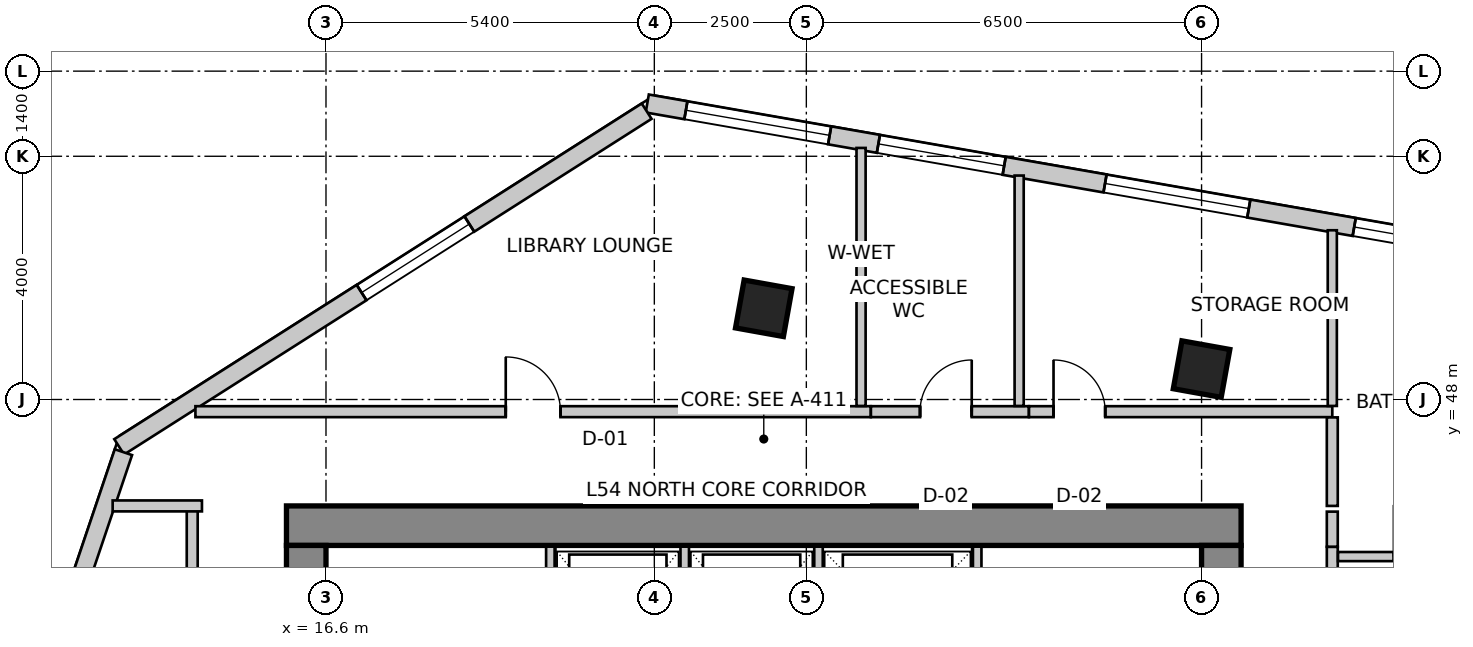
"""IFC4 building model, lengths in metres.
Left out: names, types, materials, properties, quantities, classifications, styles, units other than length and angle.
Written with IfcOpenShell. Run it as: python <this file> out.ifc"""

import sys

from ifc_helpers import new_model, si_unit, direction, frame, frame_2d, origin, origin_2d, place, context, subcontext, project, spatial, rectangle, extrude, source, transform, mapped, element, fill, save


model = new_model("IFC4")
c1 = context("Model", 3, precision=1e-05, world=origin(), true_north=direction((0.0, 1.0)))
c2 = subcontext(c1, "Body", "Model", "MODEL_VIEW")
j1 = project(units=[si_unit("LENGTHUNIT", "METRE"), si_unit("PLANEANGLEUNIT", "RADIAN")], contexts=[c1])
p1 = place(None, origin())
s1 = spatial("IfcSite", under=j1, at=p1, CompositionType="ELEMENT")
p2 = place(p1, origin())
s2 = spatial("IfcBuilding", under=s1, at=p2, CompositionType="ELEMENT")
p3 = place(p2, frame((0.0, 0.0, 214.9)))
s3 = spatial("IfcBuildingStorey", under=s2, at=p3, CompositionType="ELEMENT", Elevation=214.9)
p4 = place(p3, frame((15.95, 45.925, 0.0), z_axis=(0.0, 0.0, 1.0), x_axis=(1.0, 0.0, 0.0)))
e1 = element("IfcWall", 1, at=p4, inside=s3, PredefinedType="SHEAR", context=c2, shape_type="SweptSolid", body=[
    extrude(rectangle(XDim=15.7, YDim=0.65, at=frame_2d((7.85, 0.0))), origin(), (0.0, 0.0, 1.0), 3.5),
])
p5 = place(p3, frame((16.275, 34.2, 0.0), z_axis=(0.0, 0.0, 1.0), x_axis=(0.0, 1.0, 0.0)))
e2 = element("IfcWall", 2, at=p5, inside=s3, PredefinedType="SHEAR", context=c2, shape_type="SweptSolid", body=[
    extrude(rectangle(XDim=11.4, YDim=0.65, at=frame_2d((5.7, 0.0))), origin(), (0.0, 0.0, 1.0), 3.5),
])
m1 = source(origin(), c2, "Body", "SweptSolid", [
    extrude(rectangle(XDim=1.1, YDim=2.15, at=frame_2d((0.55, 1.075))), frame((0.0, 0.335, 0.0), z_axis=(0.0, -1.0, 0.0), x_axis=(1.0, 0.0, 0.0)), (0.0, 0.0, 1.0), 0.67),
])
p6 = place(p5, frame((7.15, 0.0, 0.0)))
e3 = element("IfcOpeningElement", 3, at=p6, cuts=e2, PredefinedType="OPENING", context=c2, shape_type="MappedRepresentation", body=[
    mapped(m1, transform((0.0, 0.0, 0.0), scale=1.0)),
])
p7 = place(p3, frame((31.325, 34.2, 0.0), z_axis=(0.0, 0.0, 1.0), x_axis=(0.0, 1.0, 0.0)))
e4 = element("IfcWall", 4, at=p7, inside=s3, PredefinedType="SHEAR", context=c2, shape_type="SweptSolid", body=[
    extrude(rectangle(XDim=11.4, YDim=0.65, at=frame_2d((5.7, 0.0))), origin(), (0.0, 0.0, 1.0), 3.5),
])
p8 = place(p7, frame((7.35, 0.0, 0.0)))
e5 = element("IfcOpeningElement", 5, at=p8, cuts=e4, PredefinedType="OPENING", context=c2, shape_type="MappedRepresentation", body=[
    mapped(m1, transform((0.0, 0.0, 0.0), scale=1.0)),
])
m2 = source(origin(), c2, "Body", "SweptSolid", [
    extrude(rectangle(XDim=0.8, YDim=0.8, at=origin_2d()), origin(), (0.0, 0.0, 1.0), 3.5),
])
for number, where, z_axis, x_axis in (
    (6, (23.8, 49.5, 0.0), (0.0, 0.0, 1.0), (0.984, -0.177, 0.0)),
    (7, (31.0, 48.5, 0.0), (0.0, 0.0, 1.0), (0.984, -0.177, 0.0)),
):
    element("IfcColumn", number, at=place(p3, frame(where, z_axis=z_axis, x_axis=x_axis)), inside=s3, PredefinedType="COLUMN", context=c2, shape_type="MappedRepresentation", body=[
        mapped(m2, transform((0.0, 0.0, 0.0), scale=1.0)),
    ])
p9 = place(p3, frame((43.561, 49.081, 0.0), z_axis=(0.0, 0.0, 1.0), x_axis=(-0.985083967494, 0.17207433564, 0.0)))
e8 = element("IfcWall", 8, at=p9, inside=s3, PredefinedType="SOLIDWALL", context=c2, shape_type="SweptSolid", body=[
    extrude(rectangle(XDim=22.006, YDim=0.3, at=frame_2d((11.003, 0.0))), origin(), (0.0, 0.0, 1.0), 3.25),
])
m3 = source(origin(), c2, "Body", "SweptSolid", [
    extrude(rectangle(XDim=2.4, YDim=2.2, at=frame_2d((1.2, 1.1))), frame((0.0, 0.16, 0.0), z_axis=(0.0, -1.0, 0.0), x_axis=(1.0, 0.0, 0.0)), (0.0, 0.0, 1.0), 0.32),
])
p10 = place(p9, frame((0.8, 0.0, 0.85)))
e9 = element("IfcOpeningElement", 9, at=p10, cuts=e8, PredefinedType="OPENING", context=c2, shape_type="MappedRepresentation", body=[
    mapped(m3, transform((0.0, 0.0, 0.0), scale=1.0)),
])
p11 = place(p9, frame((4.628, 0.0, 0.85)))
e10 = element("IfcOpeningElement", 10, at=p11, cuts=e8, PredefinedType="OPENING", context=c2, shape_type="MappedRepresentation", body=[
    mapped(m3, transform((0.0, 0.0, 0.0), scale=1.0)),
])
m4 = source(origin(), c2, "Body", "SweptSolid", [
    extrude(rectangle(XDim=2.1, YDim=2.0, at=frame_2d((1.05, 1.0))), frame((0.0, 0.16, 0.0), z_axis=(0.0, -1.0, 0.0), x_axis=(1.0, 0.0, 0.0)), (0.0, 0.0, 1.0), 0.32),
])
p12 = place(p9, frame((8.103, 0.0, 0.85)))
e11 = element("IfcOpeningElement", 11, at=p12, cuts=e8, PredefinedType="OPENING", context=c2, shape_type="MappedRepresentation", body=[
    mapped(m4, transform((0.0, 0.0, 0.0), scale=1.0)),
])
p13 = place(p9, frame((11.963, 0.0, 0.85)))
e12 = element("IfcOpeningElement", 12, at=p13, cuts=e8, PredefinedType="OPENING", context=c2, shape_type="MappedRepresentation", body=[
    mapped(m3, transform((0.0, 0.0, 0.0), scale=1.0)),
])
p14 = place(p9, frame((16.047, 0.0, 0.85)))
e13 = element("IfcOpeningElement", 13, at=p14, cuts=e8, PredefinedType="OPENING", context=c2, shape_type="MappedRepresentation", body=[
    mapped(m4, transform((0.0, 0.0, 0.0), scale=1.0)),
])
p15 = place(p9, frame((18.961, 0.0, 0.85)))
e14 = element("IfcOpeningElement", 14, at=p15, cuts=e8, PredefinedType="OPENING", context=c2, shape_type="MappedRepresentation", body=[
    mapped(m3, transform((0.0, 0.0, 0.0), scale=1.0)),
])
p16 = place(p3, frame((21.874, 52.742, 0.0), z_axis=(0.0, 0.0, 1.0), x_axis=(-0.84365659959, -0.536883173482, 0.0)))
e15 = element("IfcWall", 15, at=p16, inside=s3, PredefinedType="SOLIDWALL", context=c2, shape_type="SweptSolid", body=[
    extrude(rectangle(XDim=10.283, YDim=0.3, at=frame_2d((5.142, 0.0))), origin(), (0.0, 0.0, 1.0), 3.25),
])
p17 = place(p16, frame((3.457, 0.0, 0.85)))
e16 = element("IfcOpeningElement", 16, at=p17, cuts=e15, PredefinedType="OPENING", context=c2, shape_type="MappedRepresentation", body=[
    mapped(m4, transform((0.0, 0.0, 0.0), scale=1.0)),
])
p18 = place(p3, frame((13.269, 47.134, 0.0), z_axis=(0.0, 0.0, 1.0), x_axis=(-0.319920776449, -0.947444297464, 0.0)))
e17 = element("IfcWall", 17, at=p18, inside=s3, PredefinedType="SOLIDWALL", context=c2, shape_type="SweptSolid", body=[
    extrude(rectangle(XDim=16.133, YDim=0.3, at=frame_2d((8.067, 0.0))), origin(), (0.0, 0.0, 1.0), 3.25),
])
p19 = place(p18, frame((2.363, 0.0, 0.85)))
e18 = element("IfcOpeningElement", 18, at=p19, cuts=e17, PredefinedType="OPENING", context=c2, shape_type="MappedRepresentation", body=[
    mapped(m3, transform((0.0, 0.0, 0.0), scale=1.0)),
])
p20 = place(p18, frame((7.41, 0.0, 0.85)))
e19 = element("IfcOpeningElement", 19, at=p20, cuts=e17, PredefinedType="OPENING", context=c2, shape_type="MappedRepresentation", body=[
    mapped(m4, transform((0.0, 0.0, 0.0), scale=1.0)),
])
p21 = place(p18, frame((12.157, 0.0, 0.85)))
e20 = element("IfcOpeningElement", 20, at=p21, cuts=e17, PredefinedType="OPENING", context=c2, shape_type="MappedRepresentation", body=[
    mapped(m3, transform((0.0, 0.0, 0.0), scale=1.0)),
])
for number, where, z_axis, x_axis in (
    (21, (20.29, 43.28, 0.0), (0.0, 0.0, 1.0), (0.0, 1.0, 0.0)),
    (22, (27.31, 43.28, 0.0), (0.0, 0.0, 1.0), (0.0, 1.0, 0.0)),
):
    element("IfcWall", number, at=place(p3, frame(where, z_axis=z_axis, x_axis=x_axis)), inside=s3, PredefinedType="SOLIDWALL", context=c2, shape_type="SweptSolid", body=[
        extrude(rectangle(XDim=2.3, YDim=0.14, at=frame_2d((1.15, 0.0))), origin(), (0.0, 0.0, 1.0), 3.25),
    ])
for number, where, z_axis, x_axis in (
    (23, (22.5, 43.02, 0.0), (0.0, 0.0, 1.0), (0.0, 1.0, 0.0)),
    (24, (24.7, 43.02, 0.0), (0.0, 0.0, 1.0), (0.0, 1.0, 0.0)),
):
    element("IfcWall", number, at=place(p3, frame(where, z_axis=z_axis, x_axis=x_axis)), inside=s3, PredefinedType="SOLIDWALL", context=c2, shape_type="SweptSolid", body=[
        extrude(rectangle(XDim=2.56, YDim=0.14, at=frame_2d((1.28, 0.0))), origin(), (0.0, 0.0, 1.0), 3.25),
    ])
p22 = place(p3, frame((14.4, 33.644, 0.0), z_axis=(0.0, 0.0, 1.0), x_axis=(0.0, 1.0, 0.0)))
e25 = element("IfcWall", 25, at=p22, inside=s3, PredefinedType="PARTITIONING", context=c2, shape_type="SweptSolid", body=[
    extrude(rectangle(XDim=12.606, YDim=0.18, at=frame_2d((6.303, 0.0))), origin(), (0.0, 0.0, 1.0), 3.25),
])
m5 = source(origin(), c2, "Body", "SweptSolid", [
    extrude(rectangle(XDim=0.9, YDim=2.15, at=frame_2d((0.45, 1.075))), frame((0.0, 0.1, 0.0), z_axis=(0.0, -1.0, 0.0), x_axis=(1.0, 0.0, 0.0)), (0.0, 0.0, 1.0), 0.2),
])
p23 = place(p22, frame((4.399, 0.0, 0.0)))
e26 = element("IfcOpeningElement", 26, at=p23, cuts=e25, PredefinedType="OPENING", context=c2, shape_type="MappedRepresentation", body=[
    mapped(m5, transform((0.0, 0.0, 0.0), scale=1.0)),
])
p24 = place(p3, frame((14.56, 46.25, 0.0), z_axis=(0.0, 0.0, 1.0), x_axis=(-1.0, 0.0, 0.0)))
e27 = element("IfcWall", 27, at=p24, inside=s3, PredefinedType="PARTITIONING", context=c2, shape_type="SweptSolid", body=[
    extrude(rectangle(XDim=1.469, YDim=0.18, at=frame_2d((0.734, 0.0))), origin(), (0.0, 0.0, 1.0), 3.25),
])
p25 = place(p3, frame((14.453, 47.8, 0.0), z_axis=(0.0, 0.0, 1.0), x_axis=(1.0, 0.0, 0.0)))
e28 = element("IfcWall", 28, at=p25, inside=s3, PredefinedType="PARTITIONING", context=c2, shape_type="SweptSolid", body=[
    extrude(rectangle(XDim=11.107, YDim=0.18, at=frame_2d((5.554, 0.0))), origin(), (0.0, 0.0, 1.0), 2.835),
])
p26 = place(p25, frame((5.104, 0.0, 0.0)))
e29 = element("IfcOpeningElement", 29, at=p26, cuts=e28, PredefinedType="OPENING", context=c2, shape_type="MappedRepresentation", body=[
    mapped(m5, transform((0.0, 0.0, 0.0), scale=1.0)),
])
p27 = place(p3, frame((25.562, 47.8, 0.0), z_axis=(0.0, 0.0, 1.0), x_axis=(1.0, 0.0, 0.0)))
e30 = element("IfcWall", 30, at=p27, inside=s3, PredefinedType="PARTITIONING", context=c2, shape_type="SweptSolid", body=[
    extrude(rectangle(XDim=2.598, YDim=0.18, at=frame_2d((1.299, 0.0))), origin(), (0.0, 0.0, 1.0), 3.25),
])
m6 = source(origin(), c2, "Body", "SweptSolid", [
    extrude(rectangle(XDim=0.85, YDim=2.15, at=frame_2d((0.425, 1.075))), frame((0.0, 0.1, 0.0), z_axis=(0.0, -1.0, 0.0), x_axis=(1.0, 0.0, 0.0)), (0.0, 0.0, 1.0), 0.2),
])
p28 = place(p27, frame((0.808, 0.0, 0.0)))
e31 = element("IfcOpeningElement", 31, at=p28, cuts=e30, PredefinedType="OPENING", context=c2, shape_type="MappedRepresentation", body=[
    mapped(m6, transform((0.0, 0.0, 0.0), scale=1.0)),
])
p29 = place(p3, frame((28.162, 47.8, 0.0), z_axis=(0.0, 0.0, 1.0), x_axis=(1.0, 0.0, 0.0)))
e32 = element("IfcWall", 32, at=p29, inside=s3, PredefinedType="PARTITIONING", context=c2, shape_type="SweptSolid", body=[
    extrude(rectangle(XDim=4.988, YDim=0.18, at=frame_2d((2.494, 0.0))), origin(), (0.0, 0.0, 1.0), 2.688),
])
p30 = place(p29, frame((0.403, 0.0, 0.0)))
e33 = element("IfcOpeningElement", 33, at=p30, cuts=e32, PredefinedType="OPENING", context=c2, shape_type="MappedRepresentation", body=[
    mapped(m6, transform((0.0, 0.0, 0.0), scale=1.0)),
])
p31 = place(p3, frame((33.15, 47.706, 0.0), z_axis=(0.0, 0.0, 1.0), x_axis=(0.0, -1.0, 0.0)))
e34 = element("IfcWall", 34, at=p31, inside=s3, PredefinedType="PARTITIONING", context=c2, shape_type="SweptSolid", body=[
    extrude(rectangle(XDim=1.456, YDim=0.18, at=frame_2d((0.728, 0.0))), origin(), (0.0, 0.0, 1.0), 2.835),
])
p32 = place(p3, frame((33.15, 45.577, 0.0), z_axis=(0.0, 0.0, 1.0), x_axis=(0.0, -1.0, 0.0)))
e35 = element("IfcWall", 35, at=p32, inside=s3, PredefinedType="PARTITIONING", context=c2, shape_type="SweptSolid", body=[
    extrude(rectangle(XDim=5.687, YDim=0.18, at=frame_2d((2.844, 0.0))), origin(), (0.0, 0.0, 1.0), 2.688),
])
p33 = place(p3, frame((33.15, 46.156, 0.0), z_axis=(0.0, 0.0, 1.0), x_axis=(0.0, -1.0, 0.0)))
e36 = element("IfcWall", 36, at=p33, inside=s3, PredefinedType="PARTITIONING", context=c2, shape_type="SweptSolid", body=[
    extrude(rectangle(XDim=0.577, YDim=0.18, at=frame_2d((0.289, 0.0))), origin(), (0.0, 0.0, 1.0), 2.688),
])
p34 = place(p3, frame((25.4, 52.137, 0.0), z_axis=(0.0, 0.0, 1.0), x_axis=(0.0, -1.0, 0.0)))
e37 = element("IfcWall", 37, at=p34, inside=s3, PredefinedType="PARTITIONING", context=c2, shape_type="SweptSolid", body=[
    extrude(rectangle(XDim=4.243, YDim=0.15, at=frame_2d((2.122, 0.0))), origin(), (0.0, 0.0, 1.0), 2.542),
])
p35 = place(p3, frame((28.0, 51.683, 0.0), z_axis=(0.0, 0.0, 1.0), x_axis=(0.0, -1.0, 0.0)))
e38 = element("IfcWall", 38, at=p35, inside=s3, PredefinedType="PARTITIONING", context=c2, shape_type="SweptSolid", body=[
    extrude(rectangle(XDim=3.789, YDim=0.15, at=frame_2d((1.895, 0.0))), origin(), (0.0, 0.0, 1.0), 2.542),
])
p36 = place(p3, frame((33.15, 50.783, 0.0), z_axis=(0.0, 0.0, 1.0), x_axis=(0.0, -1.0, 0.0)))
e39 = element("IfcWall", 39, at=p36, inside=s3, PredefinedType="PARTITIONING", context=c2, shape_type="SweptSolid", body=[
    extrude(rectangle(XDim=2.889, YDim=0.15, at=frame_2d((1.445, 0.0))), origin(), (0.0, 0.0, 1.0), 2.542),
])
p37 = place(p3, frame((33.244, 45.417, 0.0), z_axis=(0.0, 0.0, 1.0), x_axis=(1.0, 0.0, 0.0)))
e40 = element("IfcWall", 40, at=p37, inside=s3, PredefinedType="PARTITIONING", context=c2, shape_type="SweptSolid", body=[
    extrude(rectangle(XDim=2.816, YDim=0.15, at=frame_2d((1.408, 0.0))), origin(), (0.0, 0.0, 1.0), 2.835),
])
m7 = source(origin(), c2, "Body", "SweptSolid", [
    extrude(rectangle(XDim=0.85, YDim=2.15, at=frame_2d((0.425, 1.075))), frame((0.0, 0.085, 0.0), z_axis=(0.0, -1.0, 0.0), x_axis=(1.0, 0.0, 0.0)), (0.0, 0.0, 1.0), 0.17),
])
p38 = place(p37, frame((0.919, 0.0, 0.0)))
e41 = element("IfcOpeningElement", 41, at=p38, cuts=e40, PredefinedType="OPENING", context=c2, shape_type="MappedRepresentation", body=[
    mapped(m7, transform((0.0, 0.0, 0.0), scale=1.0)),
])
m8 = source(origin(), c2, "Body", "SweptSolid", [
    extrude(rectangle(XDim=2.1, YDim=2.0, at=frame_2d((1.05, 1.0))), frame((0.0, -0.015, 0.0), z_axis=(0.0, -1.0, 0.0), x_axis=(1.0, 0.0, 0.0)), (0.0, 0.0, 1.0), 0.06),
])
p39 = place(p12, origin())
e42 = element("IfcWindow", 42, at=p39, inside=s3, PartitioningType="SINGLE_PANEL", PredefinedType="WINDOW", context=c2, shape_type="MappedRepresentation", body=[
    mapped(m8, transform((0.0, 0.0, 0.0), scale=1.0)),
])
fill(e11, e42)
m9 = source(origin(), c2, "Body", "SweptSolid", [
    extrude(rectangle(XDim=2.4, YDim=2.2, at=frame_2d((1.2, 1.1))), frame((0.0, -0.015, 0.0), z_axis=(0.0, -1.0, 0.0), x_axis=(1.0, 0.0, 0.0)), (0.0, 0.0, 1.0), 0.06),
])
p40 = place(p13, origin())
e43 = element("IfcWindow", 43, at=p40, inside=s3, PartitioningType="SINGLE_PANEL", PredefinedType="WINDOW", context=c2, shape_type="MappedRepresentation", body=[
    mapped(m9, transform((0.0, 0.0, 0.0), scale=1.0)),
])
fill(e12, e43)
p41 = place(p14, origin())
e44 = element("IfcWindow", 44, at=p41, inside=s3, PartitioningType="SINGLE_PANEL", PredefinedType="WINDOW", context=c2, shape_type="MappedRepresentation", body=[
    mapped(m8, transform((0.0, 0.0, 0.0), scale=1.0)),
])
fill(e13, e44)
p42 = place(p15, origin())
e45 = element("IfcWindow", 45, at=p42, inside=s3, PartitioningType="SINGLE_PANEL", PredefinedType="WINDOW", context=c2, shape_type="MappedRepresentation", body=[
    mapped(m9, transform((0.0, 0.0, 0.0), scale=1.0)),
])
fill(e14, e45)
p43 = place(p17, origin())
e46 = element("IfcWindow", 46, at=p43, inside=s3, PartitioningType="SINGLE_PANEL", PredefinedType="WINDOW", context=c2, shape_type="MappedRepresentation", body=[
    mapped(m8, transform((0.0, 0.0, 0.0), scale=1.0)),
])
fill(e16, e46)
m10 = source(origin(), c2, "Body", "SweptSolid", [
    extrude(rectangle(XDim=0.9, YDim=2.15, at=frame_2d((0.45, 1.075))), frame((0.0, 0.025, 0.0), z_axis=(0.0, -1.0, 0.0), x_axis=(1.0, 0.0, 0.0)), (0.0, 0.0, 1.0), 0.05),
])
p44 = place(p26, origin())
e47 = element("IfcDoor", 47, at=p44, inside=s3, OperationType="SINGLE_SWING_LEFT", PredefinedType="DOOR", context=c2, shape_type="MappedRepresentation", body=[
    mapped(m10, transform((0.0, 0.0, 0.0), scale=1.0)),
])
fill(e29, e47)
m11 = source(origin(), c2, "Body", "SweptSolid", [
    extrude(rectangle(XDim=0.85, YDim=2.15, at=frame_2d((0.425, 1.075))), frame((0.0, 0.025, 0.0), z_axis=(0.0, -1.0, 0.0), x_axis=(1.0, 0.0, 0.0)), (0.0, 0.0, 1.0), 0.05),
])
p45 = place(p28, origin())
e48 = element("IfcDoor", 48, at=p45, inside=s3, OperationType="SINGLE_SWING_RIGHT", PredefinedType="DOOR", context=c2, shape_type="MappedRepresentation", body=[
    mapped(m11, transform((0.0, 0.0, 0.0), scale=1.0)),
])
fill(e31, e48)
p46 = place(p30, origin())
e49 = element("IfcDoor", 49, at=p46, inside=s3, OperationType="SINGLE_SWING_LEFT", PredefinedType="DOOR", context=c2, shape_type="MappedRepresentation", body=[
    mapped(m11, transform((0.0, 0.0, 0.0), scale=1.0)),
])
fill(e33, e49)
save(model, sys.argv[1])
